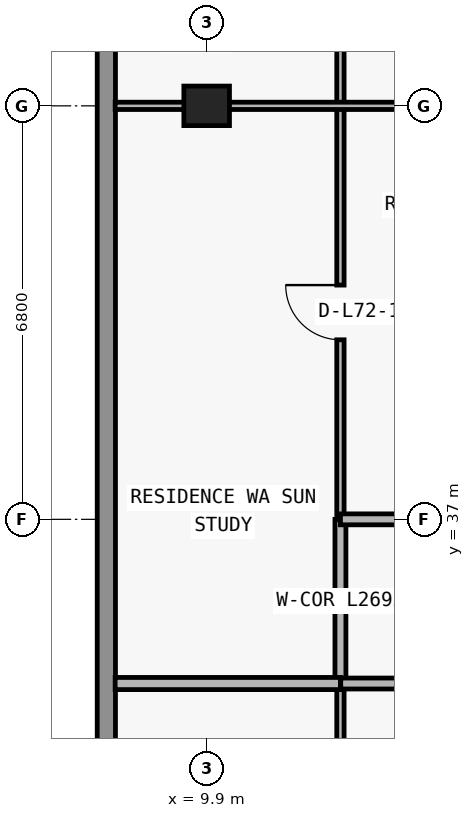
"""IFC4 building model, lengths in metres.
Left out: names, types, materials, properties, quantities, classifications, styles, units other than length and angle.
Written with IfcOpenShell. Run it as: python <this file> out.ifc"""

import sys

from ifc_helpers import new_model, si_unit, direction, frame, frame_2d, origin, origin_2d, place, context, subcontext, project, spatial, rectangle, extrude, element, fill, save


model = new_model("IFC4")
c1 = context("Model", 3, precision=1e-05, world=origin(), true_north=direction((0.0, 1.0)))
c2 = subcontext(c1, "Body", "Model", "MODEL_VIEW")
j1 = project(units=[si_unit("LENGTHUNIT", "METRE"), si_unit("PLANEANGLEUNIT", "RADIAN")], contexts=[c1])
p1 = place(None, origin())
s1 = spatial("IfcSite", under=j1, at=p1, CompositionType="ELEMENT")
p2 = place(p1, origin())
s2 = spatial("IfcBuilding", under=s1, at=p2, CompositionType="ELEMENT")
p3 = place(p2, frame((0.0, 0.0, 256.2)))
s3 = spatial("IfcBuildingStorey", under=s2, at=p3, CompositionType="ELEMENT", Elevation=256.2)
p4 = place(p3, frame((9.9, 43.8, 0.0), z_axis=(0.0, 0.0, 1.0), x_axis=(1.0, 0.0, 0.0)))
e1 = element("IfcColumn", 1, at=p4, inside=s3, PredefinedType="COLUMN", context=c2, shape_type="SweptSolid", body=[
    extrude(rectangle(XDim=0.75, YDim=0.65, at=origin_2d()), origin(), (0.0, 0.0, 1.0), 3.05),
])
p5 = place(p3, frame((8.25, 30.15, 0.0), z_axis=(0.0, 0.0, 1.0), x_axis=(0.0, 1.0, 0.0)))
e2 = element("IfcWall", 2, at=p5, inside=s3, PredefinedType="STANDARD", context=c2, shape_type="SweptSolid", body=[
    extrude(rectangle(XDim=16.85, YDim=0.3, at=frame_2d((8.425, 0.0))), origin(), (0.0, 0.0, 1.0), 3.05),
])
p6 = place(p3, frame((12.1, 28.68, 0.0), z_axis=(0.0, 0.0, 1.0), x_axis=(0.0, 1.0, 0.0)))
e3 = element("IfcWall", 3, at=p6, inside=s3, PredefinedType="PARTITIONING", context=c2, shape_type="SweptSolid", body=[
    extrude(rectangle(XDim=5.62, YDim=0.12, at=frame_2d((2.81, 0.0))), origin(), (0.0, 0.0, 1.0), 3.05),
])
p7 = place(p3, frame((12.1, 34.305, 0.0), z_axis=(0.0, 0.0, 1.0), x_axis=(0.0, 1.0, 0.0)))
e4 = element("IfcWall", 4, at=p7, inside=s3, PredefinedType="PARTITIONING", context=c2, shape_type="SweptSolid", body=[
    extrude(rectangle(XDim=2.695, YDim=0.18, at=frame_2d((1.348, 0.0))), origin(), (0.0, 0.0, 1.0), 3.05),
])
p8 = place(p3, frame((12.1, 37.005, 0.0), z_axis=(0.0, 0.0, 1.0), x_axis=(0.0, 1.0, 0.0)))
e5 = element("IfcWall", 5, at=p8, inside=s3, PredefinedType="PARTITIONING", context=c2, shape_type="SweptSolid", body=[
    extrude(rectangle(XDim=9.875, YDim=0.12, at=frame_2d((4.938, 0.0))), origin(), (0.0, 0.0, 1.0), 3.05),
])
p9 = place(p8, frame((2.948, 0.0, 0.0)))
e6 = element("IfcOpeningElement", 6, at=p9, cuts=e5, PredefinedType="OPENING", context=c2, shape_type="SweptSolid", body=[
    extrude(rectangle(XDim=0.9, YDim=2.15, at=frame_2d((0.45, 1.075))), frame((0.0, 0.07, 0.0), z_axis=(0.0, -1.0, 0.0), x_axis=(1.0, 0.0, 0.0)), (0.0, 0.0, 1.0), 0.14),
])
p10 = place(p8, frame((7.885, 0.0, 0.0)))
e7 = element("IfcOpeningElement", 7, at=p10, cuts=e5, PredefinedType="OPENING", context=c2, shape_type="SweptSolid", body=[
    extrude(rectangle(XDim=0.9, YDim=2.15, at=frame_2d((0.45, 1.075))), frame((0.0, 0.07, 0.0), z_axis=(0.0, -1.0, 0.0), x_axis=(1.0, 0.0, 0.0)), (0.0, 0.0, 1.0), 0.14),
])
p11 = place(p3, frame((8.395, 34.3, 0.0), z_axis=(0.0, 0.0, 1.0), x_axis=(1.0, 0.0, 0.0)))
e8 = element("IfcWall", 8, at=p11, inside=s3, PredefinedType="PARTITIONING", context=c2, shape_type="SweptSolid", body=[
    extrude(rectangle(XDim=3.705, YDim=0.2, at=frame_2d((1.853, 0.0))), origin(), (0.0, 0.0, 1.0), 3.05),
])
p12 = place(p3, frame((12.105, 34.3, 0.0), z_axis=(0.0, 0.0, 1.0), x_axis=(1.0, 0.0, 0.0)))
e9 = element("IfcWall", 9, at=p12, inside=s3, PredefinedType="PARTITIONING", context=c2, shape_type="SweptSolid", body=[
    extrude(rectangle(XDim=53.595, YDim=0.18, at=frame_2d((26.797, 0.0))), origin(), (0.0, 0.0, 1.0), 3.05),
])
p13 = place(p12, frame((1.661, 0.0, 0.0)))
e10 = element("IfcOpeningElement", 10, at=p13, cuts=e9, PredefinedType="OPENING", context=c2, shape_type="SweptSolid", body=[
    extrude(rectangle(XDim=1.0, YDim=2.2, at=frame_2d((0.5, 1.1))), frame((0.0, 0.1, 0.0), z_axis=(0.0, -1.0, 0.0), x_axis=(1.0, 0.0, 0.0)), (0.0, 0.0, 1.0), 0.2),
])
p14 = place(p12, frame((17.438, 0.0, 0.0)))
e11 = element("IfcOpeningElement", 11, at=p14, cuts=e9, PredefinedType="OPENING", context=c2, shape_type="SweptSolid", body=[
    extrude(rectangle(XDim=1.0, YDim=2.2, at=frame_2d((0.5, 1.1))), frame((0.0, 0.1, 0.0), z_axis=(0.0, -1.0, 0.0), x_axis=(1.0, 0.0, 0.0)), (0.0, 0.0, 1.0), 0.2),
])
p15 = place(p12, frame((41.727, 0.0, 0.0)))
e12 = element("IfcOpeningElement", 12, at=p15, cuts=e9, PredefinedType="OPENING", context=c2, shape_type="SweptSolid", body=[
    extrude(rectangle(XDim=1.0, YDim=2.2, at=frame_2d((0.5, 1.1))), frame((0.0, 0.1, 0.0), z_axis=(0.0, -1.0, 0.0), x_axis=(1.0, 0.0, 0.0)), (0.0, 0.0, 1.0), 0.2),
])
p16 = place(p12, frame((49.141, 0.0, 0.0)))
e13 = element("IfcOpeningElement", 13, at=p16, cuts=e9, PredefinedType="OPENING", context=c2, shape_type="SweptSolid", body=[
    extrude(rectangle(XDim=1.0, YDim=2.2, at=frame_2d((0.5, 1.1))), frame((0.0, 0.1, 0.0), z_axis=(0.0, -1.0, 0.0), x_axis=(1.0, 0.0, 0.0)), (0.0, 0.0, 1.0), 0.2),
])
p17 = place(p3, frame((12.1, 37.0, 0.0), z_axis=(0.0, 0.0, 1.0), x_axis=(1.0, 0.0, 0.0)))
e14 = element("IfcWall", 14, at=p17, inside=s3, PredefinedType="PARTITIONING", context=c2, shape_type="SweptSolid", body=[
    extrude(rectangle(XDim=5.845, YDim=0.18, at=frame_2d((2.922, 0.0))), origin(), (0.0, 0.0, 1.0), 3.05),
])
p18 = place(p17, frame((1.275, 0.0, 0.0)))
e15 = element("IfcOpeningElement", 15, at=p18, cuts=e14, PredefinedType="OPENING", context=c2, shape_type="SweptSolid", body=[
    extrude(rectangle(XDim=1.0, YDim=2.2, at=frame_2d((0.5, 1.1))), frame((0.0, 0.1, 0.0), z_axis=(0.0, -1.0, 0.0), x_axis=(1.0, 0.0, 0.0)), (0.0, 0.0, 1.0), 0.2),
])
p19 = place(p3, frame((8.395, 43.8, 0.0), z_axis=(0.0, 0.0, 1.0), x_axis=(1.0, 0.0, 0.0)))
e16 = element("IfcWall", 16, at=p19, inside=s3, PredefinedType="PARTITIONING", context=c2, shape_type="SweptSolid", body=[
    extrude(rectangle(XDim=9.56, YDim=0.12, at=frame_2d((4.78, 0.0))), origin(), (0.0, 0.0, 1.0), 2.418),
])
p20 = place(p19, frame((5.03, 0.0, 0.0)))
e17 = element("IfcOpeningElement", 17, at=p20, cuts=e16, PredefinedType="OPENING", context=c2, shape_type="SweptSolid", body=[
    extrude(rectangle(XDim=0.9, YDim=2.15, at=frame_2d((0.45, 1.075))), frame((0.0, 0.07, 0.0), z_axis=(0.0, -1.0, 0.0), x_axis=(1.0, 0.0, 0.0)), (0.0, 0.0, 1.0), 0.14),
])
p21 = place(p19, frame((7.982, 0.0, 0.0)))
e18 = element("IfcOpeningElement", 18, at=p21, cuts=e16, PredefinedType="OPENING", context=c2, shape_type="SweptSolid", body=[
    extrude(rectangle(XDim=0.85, YDim=2.1, at=frame_2d((0.425, 1.05))), frame((0.0, 0.07, 0.0), z_axis=(0.0, -1.0, 0.0), x_axis=(1.0, 0.0, 0.0)), (0.0, 0.0, 1.0), 0.14),
])
p22 = place(p9, origin())
e19 = element("IfcDoor", 19, at=p22, inside=s3, OperationType="SINGLE_SWING_RIGHT", PredefinedType="DOOR", context=c2, shape_type="SweptSolid", body=[
    extrude(rectangle(XDim=0.9, YDim=2.15, at=frame_2d((0.45, 1.075))), frame((0.0, 0.025, 0.0), z_axis=(0.0, -1.0, 0.0), x_axis=(1.0, 0.0, 0.0)), (0.0, 0.0, 1.0), 0.05),
])
fill(e6, e19)
save(model, sys.argv[1])
